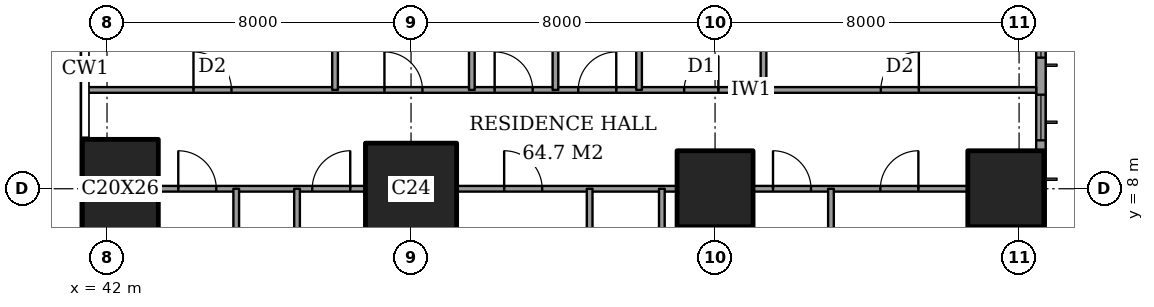
"""IFC4 building model, lengths in metres.
Left out: names, types, materials, properties, quantities, classifications, styles, units other than length and angle.
Written with IfcOpenShell. Run it as: python <this file> out.ifc"""

import sys

from ifc_helpers import new_model, si_unit, direction, frame, frame_2d, origin, origin_2d, place, context, subcontext, project, spatial, rectangle, extrude, element, fill, save


model = new_model("IFC4")
c1 = context("Model", 3, precision=1e-05, world=origin(), true_north=direction((0.0, 1.0)))
c2 = subcontext(c1, "Body", "Model", "MODEL_VIEW")
j1 = project(units=[si_unit("LENGTHUNIT", "METRE"), si_unit("PLANEANGLEUNIT", "RADIAN")], contexts=[c1])
p1 = place(None, origin())
s1 = spatial("IfcSite", under=j1, at=p1, CompositionType="ELEMENT")
p2 = place(p1, origin())
s2 = spatial("IfcBuilding", under=s1, at=p2, CompositionType="ELEMENT")
p3 = place(p2, frame((0.0, 0.0, 80.0)))
s3 = spatial("IfcBuildingStorey", under=s2, at=p3, CompositionType="ELEMENT", Elevation=80.0)
p4 = place(p3, frame((42.35, 8.0, 0.0), z_axis=(0.0, 0.0, 1.0), x_axis=(1.0, 0.0, 0.0)))
e1 = element("IfcColumn", 1, at=p4, inside=s3, PredefinedType="COLUMN", context=c2, shape_type="SweptSolid", body=[
    extrude(rectangle(XDim=2.0, YDim=2.6, at=origin_2d()), origin(), (0.0, 0.0, 1.0), 3.6),
])
p5 = place(p3, frame((50.0, 8.0, 0.0), z_axis=(0.0, 0.0, 1.0), x_axis=(1.0, 0.0, 0.0)))
e2 = element("IfcColumn", 2, at=p5, inside=s3, PredefinedType="COLUMN", context=c2, shape_type="SweptSolid", body=[
    extrude(rectangle(XDim=2.4, YDim=2.4, at=origin_2d()), origin(), (0.0, 0.0, 1.0), 3.6),
])
for number, where, z_axis, x_axis in (
    (3, (58.0, 8.0, 0.0), (0.0, 0.0, 1.0), (1.0, 0.0, 0.0)),
    (4, (65.65, 8.0, 0.0), (0.0, 0.0, 1.0), (1.0, 0.0, 0.0)),
):
    element("IfcColumn", number, at=place(p3, frame(where, z_axis=z_axis, x_axis=x_axis)), inside=s3, PredefinedType="COLUMN", context=c2, shape_type="SweptSolid", body=[
        extrude(rectangle(XDim=2.0, YDim=2.0, at=origin_2d()), origin(), (0.0, 0.0, 1.0), 3.6),
    ])
p6 = place(p3, frame((66.575, 3.175, 0.0), z_axis=(0.0, 0.0, 1.0), x_axis=(0.0, 1.0, 0.0)))
e5 = element("IfcWall", 5, at=p6, inside=s3, PredefinedType="SOLIDWALL", context=c2, shape_type="SweptSolid", body=[
    extrude(rectangle(XDim=41.65, YDim=0.25, at=frame_2d((20.825, 0.0))), origin(), (0.0, 0.0, 1.0), 3.6),
])
p7 = place(p6, frame((0.775, 0.0, 0.6)))
e6 = element("IfcOpeningElement", 6, at=p7, cuts=e5, PredefinedType="OPENING", context=c2, shape_type="SweptSolid", body=[
    extrude(rectangle(XDim=2.4, YDim=2.0, at=frame_2d((1.2, 1.0))), frame((0.0, 0.135, 0.0), z_axis=(0.0, -1.0, 0.0), x_axis=(1.0, 0.0, 0.0)), (0.0, 0.0, 1.0), 0.27),
])
p8 = place(p6, frame((6.1, 0.0, 0.6)))
e7 = element("IfcOpeningElement", 7, at=p8, cuts=e5, PredefinedType="OPENING", context=c2, shape_type="SweptSolid", body=[
    extrude(rectangle(XDim=1.2, YDim=2.0, at=frame_2d((0.6, 1.0))), frame((0.0, 0.135, 0.0), z_axis=(0.0, -1.0, 0.0), x_axis=(1.0, 0.0, 0.0)), (0.0, 0.0, 1.0), 0.27),
])
p9 = place(p6, frame((8.275, 0.0, 0.6)))
e8 = element("IfcOpeningElement", 8, at=p9, cuts=e5, PredefinedType="OPENING", context=c2, shape_type="SweptSolid", body=[
    extrude(rectangle(XDim=2.4, YDim=2.0, at=frame_2d((1.2, 1.0))), frame((0.0, 0.135, 0.0), z_axis=(0.0, -1.0, 0.0), x_axis=(1.0, 0.0, 0.0)), (0.0, 0.0, 1.0), 0.27),
])
p10 = place(p6, frame((15.775, 0.0, 0.6)))
e9 = element("IfcOpeningElement", 9, at=p10, cuts=e5, PredefinedType="OPENING", context=c2, shape_type="SweptSolid", body=[
    extrude(rectangle(XDim=2.4, YDim=2.0, at=frame_2d((1.2, 1.0))), frame((0.0, 0.135, 0.0), z_axis=(0.0, -1.0, 0.0), x_axis=(1.0, 0.0, 0.0)), (0.0, 0.0, 1.0), 0.27),
])
p11 = place(p6, frame((23.475, 0.0, 0.6)))
e10 = element("IfcOpeningElement", 10, at=p11, cuts=e5, PredefinedType="OPENING", context=c2, shape_type="SweptSolid", body=[
    extrude(rectangle(XDim=2.4, YDim=2.0, at=frame_2d((1.2, 1.0))), frame((0.0, 0.135, 0.0), z_axis=(0.0, -1.0, 0.0), x_axis=(1.0, 0.0, 0.0)), (0.0, 0.0, 1.0), 0.27),
])
p12 = place(p6, frame((30.975, 0.0, 0.6)))
e11 = element("IfcOpeningElement", 11, at=p12, cuts=e5, PredefinedType="OPENING", context=c2, shape_type="SweptSolid", body=[
    extrude(rectangle(XDim=2.4, YDim=2.0, at=frame_2d((1.2, 1.0))), frame((0.0, 0.135, 0.0), z_axis=(0.0, -1.0, 0.0), x_axis=(1.0, 0.0, 0.0)), (0.0, 0.0, 1.0), 0.27),
])
p13 = place(p6, frame((34.5, 0.0, 0.6)))
e12 = element("IfcOpeningElement", 12, at=p13, cuts=e5, PredefinedType="OPENING", context=c2, shape_type="SweptSolid", body=[
    extrude(rectangle(XDim=1.2, YDim=2.0, at=frame_2d((0.6, 1.0))), frame((0.0, 0.135, 0.0), z_axis=(0.0, -1.0, 0.0), x_axis=(1.0, 0.0, 0.0)), (0.0, 0.0, 1.0), 0.27),
])
p14 = place(p6, frame((38.475, 0.0, 0.6)))
e13 = element("IfcOpeningElement", 13, at=p14, cuts=e5, PredefinedType="OPENING", context=c2, shape_type="SweptSolid", body=[
    extrude(rectangle(XDim=2.4, YDim=2.0, at=frame_2d((1.2, 1.0))), frame((0.0, 0.135, 0.0), z_axis=(0.0, -1.0, 0.0), x_axis=(1.0, 0.0, 0.0)), (0.0, 0.0, 1.0), 0.27),
])
p15 = place(p3, frame((43.35, 8.0, 0.0), z_axis=(0.0, 0.0, 1.0), x_axis=(1.0, 0.0, 0.0)))
e14 = element("IfcWall", 14, at=p15, inside=s3, PredefinedType="PARTITIONING", context=c2, shape_type="SweptSolid", body=[
    extrude(rectangle(XDim=5.45, YDim=0.15, at=frame_2d((2.725, 0.0))), origin(), (0.0, 0.0, 1.0), 3.35),
])
p16 = place(p15, frame((4.05, 0.0, 0.0)))
e15 = element("IfcOpeningElement", 15, at=p16, cuts=e14, PredefinedType="OPENING", context=c2, shape_type="SweptSolid", body=[
    extrude(rectangle(XDim=1.0, YDim=2.1, at=frame_2d((0.5, 1.05))), frame((0.0, 0.085, 0.0), z_axis=(0.0, -1.0, 0.0), x_axis=(1.0, 0.0, 0.0)), (0.0, 0.0, 1.0), 0.17),
])
p17 = place(p15, frame((0.525, 0.0, 0.0)))
e16 = element("IfcOpeningElement", 16, at=p17, cuts=e14, PredefinedType="OPENING", context=c2, shape_type="SweptSolid", body=[
    extrude(rectangle(XDim=1.0, YDim=2.1, at=frame_2d((0.5, 1.05))), frame((0.0, 0.085, 0.0), z_axis=(0.0, -1.0, 0.0), x_axis=(1.0, 0.0, 0.0)), (0.0, 0.0, 1.0), 0.17),
])
p18 = place(p3, frame((51.2, 8.0, 0.0), z_axis=(0.0, 0.0, 1.0), x_axis=(1.0, 0.0, 0.0)))
e17 = element("IfcWall", 17, at=p18, inside=s3, PredefinedType="PARTITIONING", context=c2, shape_type="SweptSolid", body=[
    extrude(rectangle(XDim=5.8, YDim=0.15, at=frame_2d((2.9, 0.0))), origin(), (0.0, 0.0, 1.0), 3.35),
])
p19 = place(p18, frame((1.25, 0.0, 0.0)))
e18 = element("IfcOpeningElement", 18, at=p19, cuts=e17, PredefinedType="OPENING", context=c2, shape_type="SweptSolid", body=[
    extrude(rectangle(XDim=1.0, YDim=2.1, at=frame_2d((0.5, 1.05))), frame((0.0, 0.085, 0.0), z_axis=(0.0, -1.0, 0.0), x_axis=(1.0, 0.0, 0.0)), (0.0, 0.0, 1.0), 0.17),
])
p20 = place(p3, frame((59.0, 8.0, 0.0), z_axis=(0.0, 0.0, 1.0), x_axis=(1.0, 0.0, 0.0)))
e19 = element("IfcWall", 19, at=p20, inside=s3, PredefinedType="PARTITIONING", context=c2, shape_type="SweptSolid", body=[
    extrude(rectangle(XDim=5.65, YDim=0.15, at=frame_2d((2.825, 0.0))), origin(), (0.0, 0.0, 1.0), 3.35),
])
p21 = place(p20, frame((3.35, 0.0, 0.0)))
e20 = element("IfcOpeningElement", 20, at=p21, cuts=e19, PredefinedType="OPENING", context=c2, shape_type="SweptSolid", body=[
    extrude(rectangle(XDim=1.0, YDim=2.1, at=frame_2d((0.5, 1.05))), frame((0.0, 0.085, 0.0), z_axis=(0.0, -1.0, 0.0), x_axis=(1.0, 0.0, 0.0)), (0.0, 0.0, 1.0), 0.17),
])
p22 = place(p20, frame((0.525, 0.0, 0.0)))
e21 = element("IfcOpeningElement", 21, at=p22, cuts=e19, PredefinedType="OPENING", context=c2, shape_type="SweptSolid", body=[
    extrude(rectangle(XDim=1.0, YDim=2.1, at=frame_2d((0.5, 1.05))), frame((0.0, 0.085, 0.0), z_axis=(0.0, -1.0, 0.0), x_axis=(1.0, 0.0, 0.0)), (0.0, 0.0, 1.0), 0.17),
])
p23 = place(p3, frame((41.439, 10.6, 0.0), z_axis=(0.0, 0.0, 1.0), x_axis=(1.0, 0.0, 0.0)))
e22 = element("IfcWall", 22, at=p23, inside=s3, PredefinedType="PARTITIONING", context=c2, shape_type="SweptSolid", body=[
    extrude(rectangle(XDim=25.011, YDim=0.15, at=frame_2d((12.505, 0.0))), origin(), (0.0, 0.0, 1.0), 3.35),
])
p24 = place(p23, frame((10.761, 0.0, 0.0)))
e23 = element("IfcOpeningElement", 23, at=p24, cuts=e22, PredefinedType="OPENING", context=c2, shape_type="SweptSolid", body=[
    extrude(rectangle(XDim=1.0, YDim=2.1, at=frame_2d((0.5, 1.05))), frame((0.0, 0.085, 0.0), z_axis=(0.0, -1.0, 0.0), x_axis=(1.0, 0.0, 0.0)), (0.0, 0.0, 1.0), 0.17),
])
p25 = place(p23, frame((20.924, 0.0, 0.0)))
e24 = element("IfcOpeningElement", 24, at=p25, cuts=e22, PredefinedType="OPENING", context=c2, shape_type="SweptSolid", body=[
    extrude(rectangle(XDim=1.0, YDim=2.1, at=frame_2d((0.5, 1.05))), frame((0.0, 0.085, 0.0), z_axis=(0.0, -1.0, 0.0), x_axis=(1.0, 0.0, 0.0)), (0.0, 0.0, 1.0), 0.17),
])
p26 = place(p23, frame((15.749, 0.0, 0.0)))
e25 = element("IfcOpeningElement", 25, at=p26, cuts=e22, PredefinedType="OPENING", context=c2, shape_type="SweptSolid", body=[
    extrude(rectangle(XDim=0.9, YDim=2.1, at=frame_2d((0.45, 1.05))), frame((0.0, 0.085, 0.0), z_axis=(0.0, -1.0, 0.0), x_axis=(1.0, 0.0, 0.0)), (0.0, 0.0, 1.0), 0.17),
])
p27 = place(p23, frame((12.961, 0.0, 0.0)))
e26 = element("IfcOpeningElement", 26, at=p27, cuts=e22, PredefinedType="OPENING", context=c2, shape_type="SweptSolid", body=[
    extrude(rectangle(XDim=1.0, YDim=2.1, at=frame_2d((0.5, 1.05))), frame((0.0, 0.085, 0.0), z_axis=(0.0, -1.0, 0.0), x_axis=(1.0, 0.0, 0.0)), (0.0, 0.0, 1.0), 0.17),
])
p28 = place(p23, frame((7.861, 0.0, 0.0)))
e27 = element("IfcOpeningElement", 27, at=p28, cuts=e22, PredefinedType="OPENING", context=c2, shape_type="SweptSolid", body=[
    extrude(rectangle(XDim=1.0, YDim=2.1, at=frame_2d((0.5, 1.05))), frame((0.0, 0.085, 0.0), z_axis=(0.0, -1.0, 0.0), x_axis=(1.0, 0.0, 0.0)), (0.0, 0.0, 1.0), 0.17),
])
p29 = place(p23, frame((2.836, 0.0, 0.0)))
e28 = element("IfcOpeningElement", 28, at=p29, cuts=e22, PredefinedType="OPENING", context=c2, shape_type="SweptSolid", body=[
    extrude(rectangle(XDim=1.0, YDim=2.1, at=frame_2d((0.5, 1.05))), frame((0.0, 0.085, 0.0), z_axis=(0.0, -1.0, 0.0), x_axis=(1.0, 0.0, 0.0)), (0.0, 0.0, 1.0), 0.17),
])
p30 = place(p3, frame((45.4, -0.45, 0.0), z_axis=(0.0, 0.0, 1.0), x_axis=(0.0, 1.0, 0.0)))
e29 = element("IfcWall", 29, at=p30, inside=s3, PredefinedType="PARTITIONING", context=c2, shape_type="SweptSolid", body=[
    extrude(rectangle(XDim=8.45, YDim=0.15, at=frame_2d((4.225, 0.0))), origin(), (0.0, 0.0, 1.0), 3.35),
])
p31 = place(p30, frame((3.775, 0.0, 0.0)))
e30 = element("IfcOpeningElement", 30, at=p31, cuts=e29, PredefinedType="OPENING", context=c2, shape_type="SweptSolid", body=[
    extrude(rectangle(XDim=0.9, YDim=2.1, at=frame_2d((0.45, 1.05))), frame((0.0, 0.085, 0.0), z_axis=(0.0, -1.0, 0.0), x_axis=(1.0, 0.0, 0.0)), (0.0, 0.0, 1.0), 0.17),
])
p32 = place(p3, frame((47.0, -0.45, 0.0), z_axis=(0.0, 0.0, 1.0), x_axis=(0.0, 1.0, 0.0)))
e31 = element("IfcWall", 31, at=p32, inside=s3, PredefinedType="PARTITIONING", context=c2, shape_type="SweptSolid", body=[
    extrude(rectangle(XDim=8.45, YDim=0.15, at=frame_2d((4.225, 0.0))), origin(), (0.0, 0.0, 1.0), 3.35),
])
for number, where, z_axis, x_axis in (
    (32, (48.0, 10.6, 0.0), (0.0, 0.0, 1.0), (0.0, 1.0, 0.0)),
    (33, (51.6, 10.6, 0.0), (0.0, 0.0, 1.0), (0.0, 1.0, 0.0)),
    (34, (53.8, 10.6, 0.0), (0.0, 0.0, 1.0), (0.0, 1.0, 0.0)),
):
    element("IfcWall", number, at=place(p3, frame(where, z_axis=z_axis, x_axis=x_axis)), inside=s3, PredefinedType="PARTITIONING", context=c2, shape_type="SweptSolid", body=[
        extrude(rectangle(XDim=6.4, YDim=0.15, at=frame_2d((3.2, 0.0))), origin(), (0.0, 0.0, 1.0), 3.35),
    ])
p33 = place(p3, frame((54.7, -0.45, 0.0), z_axis=(0.0, 0.0, 1.0), x_axis=(0.0, 1.0, 0.0)))
e35 = element("IfcWall", 35, at=p33, inside=s3, PredefinedType="PARTITIONING", context=c2, shape_type="SweptSolid", body=[
    extrude(rectangle(XDim=8.45, YDim=0.15, at=frame_2d((4.225, 0.0))), origin(), (0.0, 0.0, 1.0), 3.35),
])
p34 = place(p33, frame((3.775, 0.0, 0.0)))
e36 = element("IfcOpeningElement", 36, at=p34, cuts=e35, PredefinedType="OPENING", context=c2, shape_type="SweptSolid", body=[
    extrude(rectangle(XDim=0.9, YDim=2.1, at=frame_2d((0.45, 1.05))), frame((0.0, 0.085, 0.0), z_axis=(0.0, -1.0, 0.0), x_axis=(1.0, 0.0, 0.0)), (0.0, 0.0, 1.0), 0.17),
])
p35 = place(p3, frame((56.0, 10.6, 0.0), z_axis=(0.0, 0.0, 1.0), x_axis=(0.0, 1.0, 0.0)))
e37 = element("IfcWall", 37, at=p35, inside=s3, PredefinedType="PARTITIONING", context=c2, shape_type="SweptSolid", body=[
    extrude(rectangle(XDim=11.0, YDim=0.15, at=frame_2d((5.5, 0.0))), origin(), (0.0, 0.0, 1.0), 3.35),
])
p36 = place(p35, frame((8.2, 0.0, 0.0)))
e38 = element("IfcOpeningElement", 38, at=p36, cuts=e37, PredefinedType="OPENING", context=c2, shape_type="SweptSolid", body=[
    extrude(rectangle(XDim=1.0, YDim=2.1, at=frame_2d((0.5, 1.05))), frame((0.0, 0.085, 0.0), z_axis=(0.0, -1.0, 0.0), x_axis=(1.0, 0.0, 0.0)), (0.0, 0.0, 1.0), 0.17),
])
p37 = place(p3, frame((56.6, -0.45, 0.0), z_axis=(0.0, 0.0, 1.0), x_axis=(0.0, 1.0, 0.0)))
e39 = element("IfcWall", 39, at=p37, inside=s3, PredefinedType="PARTITIONING", context=c2, shape_type="SweptSolid", body=[
    extrude(rectangle(XDim=8.45, YDim=0.15, at=frame_2d((4.225, 0.0))), origin(), (0.0, 0.0, 1.0), 3.35),
])
p38 = place(p3, frame((59.275, 10.6, 0.0), z_axis=(0.0, 0.0, 1.0), x_axis=(0.0, 1.0, 0.0)))
e40 = element("IfcWall", 40, at=p38, inside=s3, PredefinedType="PARTITIONING", context=c2, shape_type="SweptSolid", body=[
    extrude(rectangle(XDim=4.2, YDim=0.15, at=frame_2d((2.1, 0.0))), origin(), (0.0, 0.0, 1.0), 3.35),
])
p39 = place(p3, frame((61.05, -0.45, 0.0), z_axis=(0.0, 0.0, 1.0), x_axis=(0.0, 1.0, 0.0)))
e41 = element("IfcWall", 41, at=p39, inside=s3, PredefinedType="PARTITIONING", context=c2, shape_type="SweptSolid", body=[
    extrude(rectangle(XDim=8.45, YDim=0.15, at=frame_2d((4.225, 0.0))), origin(), (0.0, 0.0, 1.0), 3.35),
])
p40 = place(p8, origin())
e42 = element("IfcWindow", 42, at=p40, inside=s3, PartitioningType="SINGLE_PANEL", PredefinedType="WINDOW", context=c2, shape_type="SweptSolid", body=[
    extrude(rectangle(XDim=1.2, YDim=2.0, at=frame_2d((0.6, 1.0))), frame((0.0, 0.03, 0.0), z_axis=(0.0, -1.0, 0.0), x_axis=(1.0, 0.0, 0.0)), (0.0, 0.0, 1.0), 0.06),
])
fill(e7, e42)
p41 = place(p9, origin())
e43 = element("IfcWindow", 43, at=p41, inside=s3, PartitioningType="SINGLE_PANEL", PredefinedType="WINDOW", context=c2, shape_type="SweptSolid", body=[
    extrude(rectangle(XDim=2.4, YDim=2.0, at=frame_2d((1.2, 1.0))), frame((0.0, 0.03, 0.0), z_axis=(0.0, -1.0, 0.0), x_axis=(1.0, 0.0, 0.0)), (0.0, 0.0, 1.0), 0.06),
])
fill(e8, e43)
p42 = place(p21, origin())
e44 = element("IfcDoor", 44, at=p42, inside=s3, OperationType="SINGLE_SWING_LEFT", PredefinedType="DOOR", context=c2, shape_type="SweptSolid", body=[
    extrude(rectangle(XDim=1.0, YDim=2.1, at=frame_2d((0.5, 1.05))), frame((0.0, 0.025, 0.0), z_axis=(0.0, -1.0, 0.0), x_axis=(1.0, 0.0, 0.0)), (0.0, 0.0, 1.0), 0.05),
])
fill(e20, e44)
p43 = place(p22, origin())
e45 = element("IfcDoor", 45, at=p43, inside=s3, OperationType="SINGLE_SWING_RIGHT", PredefinedType="DOOR", context=c2, shape_type="SweptSolid", body=[
    extrude(rectangle(XDim=1.0, YDim=2.1, at=frame_2d((0.5, 1.05))), frame((0.0, 0.025, 0.0), z_axis=(0.0, -1.0, 0.0), x_axis=(1.0, 0.0, 0.0)), (0.0, 0.0, 1.0), 0.05),
])
fill(e21, e45)
p44 = place(p19, origin())
e46 = element("IfcDoor", 46, at=p44, inside=s3, OperationType="SINGLE_SWING_RIGHT", PredefinedType="DOOR", context=c2, shape_type="SweptSolid", body=[
    extrude(rectangle(XDim=1.0, YDim=2.1, at=frame_2d((0.5, 1.05))), frame((0.0, 0.025, 0.0), z_axis=(0.0, -1.0, 0.0), x_axis=(1.0, 0.0, 0.0)), (0.0, 0.0, 1.0), 0.05),
])
fill(e18, e46)
p45 = place(p16, origin())
e47 = element("IfcDoor", 47, at=p45, inside=s3, OperationType="SINGLE_SWING_LEFT", PredefinedType="DOOR", context=c2, shape_type="SweptSolid", body=[
    extrude(rectangle(XDim=1.0, YDim=2.1, at=frame_2d((0.5, 1.05))), frame((0.0, 0.025, 0.0), z_axis=(0.0, -1.0, 0.0), x_axis=(1.0, 0.0, 0.0)), (0.0, 0.0, 1.0), 0.05),
])
fill(e15, e47)
p46 = place(p17, origin())
e48 = element("IfcDoor", 48, at=p46, inside=s3, OperationType="SINGLE_SWING_RIGHT", PredefinedType="DOOR", context=c2, shape_type="SweptSolid", body=[
    extrude(rectangle(XDim=1.0, YDim=2.1, at=frame_2d((0.5, 1.05))), frame((0.0, 0.025, 0.0), z_axis=(0.0, -1.0, 0.0), x_axis=(1.0, 0.0, 0.0)), (0.0, 0.0, 1.0), 0.05),
])
fill(e16, e48)
p47 = place(p24, origin())
e49 = element("IfcDoor", 49, at=p47, inside=s3, OperationType="SINGLE_SWING_RIGHT", PredefinedType="DOOR", context=c2, shape_type="SweptSolid", body=[
    extrude(rectangle(XDim=1.0, YDim=2.1, at=frame_2d((0.5, 1.05))), frame((0.0, 0.025, 0.0), z_axis=(0.0, -1.0, 0.0), x_axis=(1.0, 0.0, 0.0)), (0.0, 0.0, 1.0), 0.05),
])
fill(e23, e49)
p48 = place(p25, origin())
e50 = element("IfcDoor", 50, at=p48, inside=s3, OperationType="SINGLE_SWING_LEFT", PredefinedType="DOOR", context=c2, shape_type="SweptSolid", body=[
    extrude(rectangle(XDim=1.0, YDim=2.1, at=frame_2d((0.5, 1.05))), frame((0.0, 0.025, 0.0), z_axis=(0.0, -1.0, 0.0), x_axis=(1.0, 0.0, 0.0)), (0.0, 0.0, 1.0), 0.05),
])
fill(e24, e50)
p49 = place(p26, origin())
e51 = element("IfcDoor", 51, at=p49, inside=s3, OperationType="SINGLE_SWING_LEFT", PredefinedType="DOOR", context=c2, shape_type="SweptSolid", body=[
    extrude(rectangle(XDim=0.9, YDim=2.1, at=frame_2d((0.45, 1.05))), frame((0.0, 0.025, 0.0), z_axis=(0.0, -1.0, 0.0), x_axis=(1.0, 0.0, 0.0)), (0.0, 0.0, 1.0), 0.05),
])
fill(e25, e51)
p50 = place(p27, origin())
e52 = element("IfcDoor", 52, at=p50, inside=s3, OperationType="SINGLE_SWING_LEFT", PredefinedType="DOOR", context=c2, shape_type="SweptSolid", body=[
    extrude(rectangle(XDim=1.0, YDim=2.1, at=frame_2d((0.5, 1.05))), frame((0.0, 0.025, 0.0), z_axis=(0.0, -1.0, 0.0), x_axis=(1.0, 0.0, 0.0)), (0.0, 0.0, 1.0), 0.05),
])
fill(e26, e52)
p51 = place(p28, origin())
e53 = element("IfcDoor", 53, at=p51, inside=s3, OperationType="SINGLE_SWING_RIGHT", PredefinedType="DOOR", context=c2, shape_type="SweptSolid", body=[
    extrude(rectangle(XDim=1.0, YDim=2.1, at=frame_2d((0.5, 1.05))), frame((0.0, 0.025, 0.0), z_axis=(0.0, -1.0, 0.0), x_axis=(1.0, 0.0, 0.0)), (0.0, 0.0, 1.0), 0.05),
])
fill(e27, e53)
p52 = place(p29, origin())
e54 = element("IfcDoor", 54, at=p52, inside=s3, OperationType="SINGLE_SWING_RIGHT", PredefinedType="DOOR", context=c2, shape_type="SweptSolid", body=[
    extrude(rectangle(XDim=1.0, YDim=2.1, at=frame_2d((0.5, 1.05))), frame((0.0, 0.025, 0.0), z_axis=(0.0, -1.0, 0.0), x_axis=(1.0, 0.0, 0.0)), (0.0, 0.0, 1.0), 0.05),
])
fill(e28, e54)
save(model, sys.argv[1])
